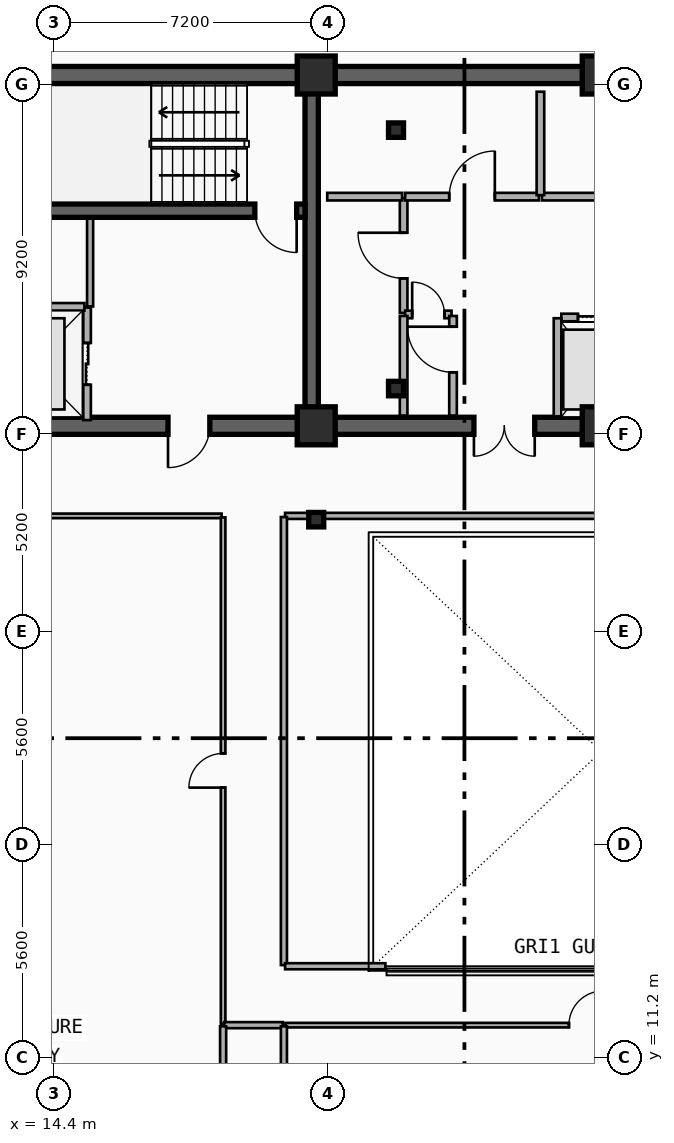
"""IFC4 building model, lengths in metres.
Left out: names, types, materials, properties, quantities, classifications, styles, units other than length and angle.
Written with IfcOpenShell. Run it as: python <this file> out.ifc"""

import sys

from ifc_helpers import new_model, si_unit, direction, frame, frame_2d, origin, origin_2d, place, context, subcontext, project, spatial, rectangle, i_section, extrude, element, fill, save


model = new_model("IFC4")
c1 = context("Model", 3, precision=1e-05, world=origin(), true_north=direction((0.0, 1.0)))
c2 = subcontext(c1, "Body", "Model", "MODEL_VIEW")
j1 = project(units=[si_unit("LENGTHUNIT", "METRE"), si_unit("PLANEANGLEUNIT", "RADIAN")], contexts=[c1])
p1 = place(None, origin())
s1 = spatial("IfcSite", under=j1, at=p1, CompositionType="ELEMENT")
p2 = place(p1, origin())
s2 = spatial("IfcBuilding", under=s1, at=p2, CompositionType="ELEMENT")
p3 = place(p2, frame((0.0, 0.0, 240.0)))
s3 = spatial("IfcBuildingStorey", under=s2, at=p3, CompositionType="ELEMENT", Elevation=240.0)
p4 = place(p3, frame((12.15, 37.05, 0.0), z_axis=(0.0, 0.0, 1.0), x_axis=(1.0, 0.0, 0.0)))
e1 = element("IfcWall", 1, at=p4, inside=s3, PredefinedType="SHEAR", context=c2, shape_type="SweptSolid", body=[
    extrude(rectangle(XDim=33.23, YDim=0.45, at=frame_2d((16.615, 0.0))), origin(), (0.0, 0.0, 1.0), 3.6),
])
p5 = place(p3, frame((21.18, 27.82, 0.0), z_axis=(0.0, 0.0, 1.0), x_axis=(-1.0, 0.0, 0.0)))
e2 = element("IfcWall", 2, at=p5, inside=s3, PredefinedType="SHEAR", context=c2, shape_type="SweptSolid", body=[
    extrude(rectangle(XDim=9.03, YDim=0.45, at=frame_2d((4.515, 0.0))), origin(), (0.0, 0.0, 1.0), 3.6),
])
p6 = place(p5, frame((2.68, 0.0, 0.0)))
e3 = element("IfcOpeningElement", 3, at=p6, cuts=e2, PredefinedType="OPENING", context=c2, shape_type="SweptSolid", body=[
    extrude(rectangle(XDim=1.1, YDim=2.15, at=frame_2d((0.55, 1.075))), frame((0.0, 0.235, 0.0), z_axis=(0.0, -1.0, 0.0), x_axis=(1.0, 0.0, 0.0)), (0.0, 0.0, 1.0), 0.47),
])
p7 = place(p3, frame((33.15, 27.82, 0.0), z_axis=(0.0, 0.0, 1.0), x_axis=(-1.0, 0.0, 0.0)))
e4 = element("IfcWall", 4, at=p7, inside=s3, PredefinedType="SHEAR", context=c2, shape_type="SweptSolid", body=[
    extrude(rectangle(XDim=11.97, YDim=0.45, at=frame_2d((5.985, 0.0))), origin(), (0.0, 0.0, 1.0), 3.6),
])
p8 = place(p7, frame((6.1, 0.0, 0.0)))
e5 = element("IfcOpeningElement", 5, at=p8, cuts=e4, PredefinedType="OPENING", context=c2, shape_type="SweptSolid", body=[
    extrude(rectangle(XDim=1.6, YDim=2.2, at=frame_2d((0.8, 1.1))), frame((0.0, 0.235, 0.0), z_axis=(0.0, -1.0, 0.0), x_axis=(1.0, 0.0, 0.0)), (0.0, 0.0, 1.0), 0.47),
])
p9 = place(p3, frame((21.18, 28.045, 0.0), z_axis=(0.0, 0.0, 1.0), x_axis=(0.0, 1.0, 0.0)))
e6 = element("IfcWall", 6, at=p9, inside=s3, PredefinedType="SHEAR", context=c2, shape_type="SweptSolid", body=[
    extrude(rectangle(XDim=8.78, YDim=0.35, at=frame_2d((4.39, 0.0))), origin(), (0.0, 0.0, 1.0), 3.6),
])
p10 = place(p3, frame((21.005, 33.48, 0.0), z_axis=(0.0, 0.0, 1.0), x_axis=(-1.0, 0.0, 0.0)))
e7 = element("IfcWall", 7, at=p10, inside=s3, PredefinedType="SHEAR", context=c2, shape_type="SweptSolid", body=[
    extrude(rectangle(XDim=8.63, YDim=0.35, at=frame_2d((4.315, 0.0))), origin(), (0.0, 0.0, 1.0), 3.6),
])
p11 = place(p10, frame((0.22, 0.0, 0.0)))
e8 = element("IfcOpeningElement", 8, at=p11, cuts=e7, PredefinedType="OPENING", context=c2, shape_type="SweptSolid", body=[
    extrude(rectangle(XDim=1.1, YDim=2.15, at=frame_2d((0.55, 1.075))), frame((0.0, 0.185, 0.0), z_axis=(0.0, -1.0, 0.0), x_axis=(1.0, 0.0, 0.0)), (0.0, 0.0, 1.0), 0.37),
])
for number, where, z_axis, x_axis in (
    (9, (23.4, 28.8, 0.0), (0.0, 0.0, 1.0), (1.0, 0.0, 0.0)),
    (10, (23.4, 35.6, 0.0), (0.0, 0.0, 1.0), (1.0, 0.0, 0.0)),
):
    element("IfcColumn", number, at=place(p3, frame(where, z_axis=z_axis, x_axis=x_axis)), inside=s3, PredefinedType="COLUMN", context=c2, shape_type="SweptSolid", body=[
        extrude(i_section(OverallWidth=0.395, OverallDepth=0.38, WebThickness=0.019, FlangeThickness=0.03, FilletRadius=0.015, at=origin_2d()), origin(), (0.0, 0.0, 1.0), 3.6),
    ])
for number, where, z_axis, x_axis in (
    (11, (21.3, 27.82, 0.0), (0.0, 0.0, 1.0), (1.0, 0.0, 0.0)),
    (12, (21.3, 37.05, 0.0), (0.0, 0.0, 1.0), (1.0, 0.0, 0.0)),
    (13, (28.8, 27.82, 0.0), (0.0, 0.0, 1.0), (1.0, 0.0, 0.0)),
    (14, (28.8, 37.05, 0.0), (0.0, 0.0, 1.0), (1.0, 0.0, 0.0)),
):
    element("IfcColumn", number, at=place(p3, frame(where, z_axis=z_axis, x_axis=x_axis)), inside=s3, PredefinedType="COLUMN", context=c2, shape_type="SweptSolid", body=[
        extrude(rectangle(XDim=1.0, YDim=1.0, at=origin_2d()), origin(), (0.0, 0.0, 1.0), 3.6),
    ])
p12 = place(p3, frame((21.3, 25.35, 0.0), z_axis=(0.0, 0.0, 1.0), x_axis=(1.0, 0.0, 0.0)))
e15 = element("IfcColumn", 15, at=p12, inside=s3, PredefinedType="COLUMN", context=c2, shape_type="SweptSolid", body=[
    extrude(i_section(OverallWidth=0.395, OverallDepth=0.38, WebThickness=0.019, FlangeThickness=0.03, FilletRadius=0.015, at=origin_2d()), origin(), (0.0, 0.0, 1.0), 3.6),
])
p13 = place(p3, frame((15.27, 27.97, 0.0), z_axis=(0.0, 0.0, 1.0), x_axis=(0.0, 1.0, 0.0)))
e16 = element("IfcWall", 16, at=p13, inside=s3, PredefinedType="PARTITIONING", context=c2, shape_type="SweptSolid", body=[
    extrude(rectangle(XDim=2.96, YDim=0.2, at=frame_2d((1.48, 0.0))), origin(), (0.0, 0.0, 1.0), 2.35),
])
p14 = place(p13, frame((0.93, 0.0, 0.0)))
e17 = element("IfcOpeningElement", 17, at=p14, cuts=e16, PredefinedType="OPENING", context=c2, shape_type="SweptSolid", body=[
    extrude(rectangle(XDim=1.1, YDim=2.15, at=frame_2d((0.55, 1.075))), frame((0.0, 0.11, 0.0), z_axis=(0.0, -1.0, 0.0), x_axis=(1.0, 0.0, 0.0)), (0.0, 0.0, 1.0), 0.22),
])
p15 = place(p3, frame((12.45, 30.95, 0.0), z_axis=(0.0, 0.0, 1.0), x_axis=(1.0, 0.0, 0.0)))
e18 = element("IfcWall", 18, at=p15, inside=s3, PredefinedType="PARTITIONING", context=c2, shape_type="SweptSolid", body=[
    extrude(rectangle(XDim=2.75, YDim=0.2, at=frame_2d((1.375, 0.0))), origin(), (0.0, 0.0, 1.0), 2.35),
])
p16 = place(p3, frame((27.75, 30.67, 0.0), z_axis=(0.0, 0.0, 1.0), x_axis=(1.0, 0.0, 0.0)))
e19 = element("IfcWall", 19, at=p16, inside=s3, PredefinedType="PARTITIONING", context=c2, shape_type="SweptSolid", body=[
    extrude(rectangle(XDim=1.975, YDim=0.2, at=frame_2d((0.988, 0.0))), origin(), (0.0, 0.0, 1.0), 2.35),
])
p17 = place(p16, frame((0.438, 0.0, 0.0)))
e20 = element("IfcOpeningElement", 20, at=p17, cuts=e19, PredefinedType="OPENING", context=c2, shape_type="SweptSolid", body=[
    extrude(rectangle(XDim=1.1, YDim=2.15, at=frame_2d((0.55, 1.075))), frame((0.0, 0.11, 0.0), z_axis=(0.0, -1.0, 0.0), x_axis=(1.0, 0.0, 0.0)), (0.0, 0.0, 1.0), 0.22),
])
p18 = place(p3, frame((27.65, 28.07, 0.0), z_axis=(0.0, 0.0, 1.0), x_axis=(0.0, 1.0, 0.0)))
e21 = element("IfcWall", 21, at=p18, inside=s3, PredefinedType="PARTITIONING", context=c2, shape_type="SweptSolid", body=[
    extrude(rectangle(XDim=2.58, YDim=0.2, at=frame_2d((1.29, 0.0))), origin(), (0.0, 0.0, 1.0), 2.35),
])
p19 = place(p3, frame((23.6, 30.79, 0.0), z_axis=(0.0, 0.0, 1.0), x_axis=(0.0, 1.0, 0.0)))
e22 = element("IfcWall", 22, at=p19, inside=s3, PredefinedType="PARTITIONING", context=c2, shape_type="SweptSolid", body=[
    extrude(rectangle(XDim=3.02, YDim=0.2, at=frame_2d((1.51, 0.0))), origin(), (0.0, 0.0, 1.0), 3.28),
])
p20 = place(p19, frame((0.91, 0.0, 0.0)))
e23 = element("IfcOpeningElement", 23, at=p20, cuts=e22, PredefinedType="OPENING", context=c2, shape_type="SweptSolid", body=[
    extrude(rectangle(XDim=1.2, YDim=2.15, at=frame_2d((0.6, 1.075))), frame((0.0, 0.11, 0.0), z_axis=(0.0, -1.0, 0.0), x_axis=(1.0, 0.0, 0.0)), (0.0, 0.0, 1.0), 0.22),
])
p21 = place(p3, frame((23.64, 30.75, 0.0), z_axis=(0.0, 0.0, 1.0), x_axis=(1.0, 0.0, 0.0)))
e24 = element("IfcWall", 24, at=p21, inside=s3, PredefinedType="PARTITIONING", context=c2, shape_type="SweptSolid", body=[
    extrude(rectangle(XDim=1.22, YDim=0.2, at=frame_2d((0.61, 0.0))), origin(), (0.0, 0.0, 1.0), 3.28),
])
p22 = place(p21, frame((0.185, 0.0, 0.0)))
e25 = element("IfcOpeningElement", 25, at=p22, cuts=e24, PredefinedType="OPENING", context=c2, shape_type="SweptSolid", body=[
    extrude(rectangle(XDim=0.85, YDim=2.1, at=frame_2d((0.425, 1.05))), frame((0.0, 0.11, 0.0), z_axis=(0.0, -1.0, 0.0), x_axis=(1.0, 0.0, 0.0)), (0.0, 0.0, 1.0), 0.22),
])
p23 = place(p3, frame((23.64, 33.85, 0.0), z_axis=(0.0, 0.0, 1.0), x_axis=(1.0, 0.0, 0.0)))
e26 = element("IfcWall", 26, at=p23, inside=s3, PredefinedType="PARTITIONING", context=c2, shape_type="SweptSolid", body=[
    extrude(rectangle(XDim=3.52, YDim=0.2, at=frame_2d((1.76, 0.0))), origin(), (0.0, 0.0, 1.0), 3.28),
])
p24 = place(p23, frame((1.16, 0.0, 0.0)))
e27 = element("IfcOpeningElement", 27, at=p24, cuts=e26, PredefinedType="OPENING", context=c2, shape_type="SweptSolid", body=[
    extrude(rectangle(XDim=1.2, YDim=2.15, at=frame_2d((0.6, 1.075))), frame((0.0, 0.11, 0.0), z_axis=(0.0, -1.0, 0.0), x_axis=(1.0, 0.0, 0.0)), (0.0, 0.0, 1.0), 0.22),
])
p25 = place(p3, frame((27.24, 33.85, 0.0), z_axis=(0.0, 0.0, 1.0), x_axis=(1.0, 0.0, 0.0)))
e28 = element("IfcWall", 28, at=p25, inside=s3, PredefinedType="PARTITIONING", context=c2, shape_type="SweptSolid", body=[
    extrude(rectangle(XDim=5.69, YDim=0.2, at=frame_2d((2.845, 0.0))), origin(), (0.0, 0.0, 1.0), 2.35),
])
p26 = place(p25, frame((2.245, 0.0, 0.0)))
e29 = element("IfcOpeningElement", 29, at=p26, cuts=e28, PredefinedType="OPENING", context=c2, shape_type="SweptSolid", body=[
    extrude(rectangle(XDim=1.2, YDim=2.15, at=frame_2d((0.6, 1.075))), frame((0.0, 0.11, 0.0), z_axis=(0.0, -1.0, 0.0), x_axis=(1.0, 0.0, 0.0)), (0.0, 0.0, 1.0), 0.22),
])
p27 = place(p3, frame((24.9, 28.09, 0.0), z_axis=(0.0, 0.0, 1.0), x_axis=(0.0, 1.0, 0.0)))
e30 = element("IfcWall", 30, at=p27, inside=s3, PredefinedType="PARTITIONING", context=c2, shape_type="SweptSolid", body=[
    extrude(rectangle(XDim=2.62, YDim=0.2, at=frame_2d((1.31, 0.0))), origin(), (0.0, 0.0, 1.0), 2.66),
])
p28 = place(p27, frame((1.137, 0.0, 0.0)))
e31 = element("IfcOpeningElement", 31, at=p28, cuts=e30, PredefinedType="OPENING", context=c2, shape_type="SweptSolid", body=[
    extrude(rectangle(XDim=1.2, YDim=2.15, at=frame_2d((0.6, 1.075))), frame((0.0, 0.11, 0.0), z_axis=(0.0, -1.0, 0.0), x_axis=(1.0, 0.0, 0.0)), (0.0, 0.0, 1.0), 0.22),
])
p29 = place(p3, frame((23.6, 28.09, 0.0), z_axis=(0.0, 0.0, 1.0), x_axis=(0.0, 1.0, 0.0)))
e32 = element("IfcWall", 32, at=p29, inside=s3, PredefinedType="PARTITIONING", context=c2, shape_type="SweptSolid", body=[
    extrude(rectangle(XDim=2.62, YDim=0.2, at=frame_2d((1.31, 0.0))), origin(), (0.0, 0.0, 1.0), 2.66),
])
p30 = place(p3, frame((21.59, 33.85, 0.0), z_axis=(0.0, 0.0, 1.0), x_axis=(1.0, 0.0, 0.0)))
e33 = element("IfcWall", 33, at=p30, inside=s3, PredefinedType="PARTITIONING", context=c2, shape_type="SweptSolid", body=[
    extrude(rectangle(XDim=1.97, YDim=0.2, at=frame_2d((0.985, 0.0))), origin(), (0.0, 0.0, 1.0), 2.35),
])
p31 = place(p3, frame((27.2, 33.89, 0.0), z_axis=(0.0, 0.0, 1.0), x_axis=(0.0, 1.0, 0.0)))
e34 = element("IfcWall", 34, at=p31, inside=s3, PredefinedType="PARTITIONING", context=c2, shape_type="SweptSolid", body=[
    extrude(rectangle(XDim=2.72, YDim=0.2, at=frame_2d((1.36, 0.0))), origin(), (0.0, 0.0, 1.0), 3.28),
])
p32 = place(p3, frame((5.66, 25.45, 0.0), z_axis=(0.0, 0.0, 1.0), x_axis=(1.0, 0.0, 0.0)))
e35 = element("IfcWall", 35, at=p32, inside=s3, PredefinedType="PARTITIONING", context=c2, shape_type="SweptSolid", body=[
    extrude(rectangle(XDim=13.15, YDim=0.12, at=frame_2d((6.575, 0.0))), origin(), (0.0, 0.0, 1.0), 2.56),
])
p33 = place(p32, frame((0.639, 0.0, 0.0)))
e36 = element("IfcOpeningElement", 36, at=p33, cuts=e35, PredefinedType="OPENING", context=c2, shape_type="SweptSolid", body=[
    extrude(rectangle(XDim=0.9, YDim=2.1, at=frame_2d((0.45, 1.05))), frame((0.0, 0.07, 0.0), z_axis=(0.0, -1.0, 0.0), x_axis=(1.0, 0.0, 0.0)), (0.0, 0.0, 1.0), 0.14),
])
p34 = place(p3, frame((18.85, 12.09, 0.0), z_axis=(0.0, 0.0, 1.0), x_axis=(0.0, 1.0, 0.0)))
e37 = element("IfcWall", 37, at=p34, inside=s3, PredefinedType="PARTITIONING", context=c2, shape_type="SweptSolid", body=[
    extrude(rectangle(XDim=13.32, YDim=0.12, at=frame_2d((6.66, 0.0))), origin(), (0.0, 0.0, 1.0), 2.71),
])
p35 = place(p34, frame((6.21, 0.0, 0.0)))
e38 = element("IfcOpeningElement", 38, at=p35, cuts=e37, PredefinedType="OPENING", context=c2, shape_type="SweptSolid", body=[
    extrude(rectangle(XDim=0.9, YDim=2.1, at=frame_2d((0.45, 1.05))), frame((0.0, 0.07, 0.0), z_axis=(0.0, -1.0, 0.0), x_axis=(1.0, 0.0, 0.0)), (0.0, 0.0, 1.0), 0.14),
])
p36 = place(p3, frame((20.49, 12.05, 0.0), z_axis=(0.0, 0.0, 1.0), x_axis=(1.0, 0.0, 0.0)))
e39 = element("IfcWall", 39, at=p36, inside=s3, PredefinedType="PARTITIONING", context=c2, shape_type="SweptSolid", body=[
    extrude(rectangle(XDim=15.82, YDim=0.12, at=frame_2d((7.91, 0.0))), origin(), (0.0, 0.0, 1.0), 2.56),
])
p37 = place(p36, frame((7.46, 0.0, 0.0)))
e40 = element("IfcOpeningElement", 40, at=p37, cuts=e39, PredefinedType="OPENING", context=c2, shape_type="SweptSolid", body=[
    extrude(rectangle(XDim=0.9, YDim=2.1, at=frame_2d((0.45, 1.05))), frame((0.0, 0.07, 0.0), z_axis=(0.0, -1.0, 0.0), x_axis=(1.0, 0.0, 0.0)), (0.0, 0.0, 1.0), 0.14),
])
p38 = place(p3, frame((15.35, 30.96, 0.0), z_axis=(0.0, 0.0, 1.0), x_axis=(0.0, 1.0, 0.0)))
e41 = element("IfcWall", 41, at=p38, inside=s3, PredefinedType="PARTITIONING", context=c2, shape_type="SweptSolid", body=[
    extrude(rectangle(XDim=2.31, YDim=0.16, at=frame_2d((1.155, 0.0))), origin(), (0.0, 0.0, 1.0), 3.28),
])
p39 = place(p3, frame((20.48, 25.45, 0.0), z_axis=(0.0, 0.0, 1.0), x_axis=(1.0, 0.0, 0.0)))
e42 = element("IfcWall", 42, at=p39, inside=s3, PredefinedType="PARTITIONING", context=c2, shape_type="SweptSolid", body=[
    extrude(rectangle(XDim=15.84, YDim=0.16, at=frame_2d((7.92, 0.0))), origin(), (0.0, 0.0, 1.0), 2.56),
])
p40 = place(p3, frame((18.88, 12.05, 0.0), z_axis=(0.0, 0.0, 1.0), x_axis=(1.0, 0.0, 0.0)))
e43 = element("IfcWall", 43, at=p40, inside=s3, PredefinedType="PARTITIONING", context=c2, shape_type="SweptSolid", body=[
    extrude(rectangle(XDim=1.54, YDim=0.16, at=frame_2d((0.77, 0.0))), origin(), (0.0, 0.0, 1.0), 2.71),
])
p41 = place(p3, frame((20.45, 13.63, 0.0), z_axis=(0.0, 0.0, 1.0), x_axis=(0.0, 1.0, 0.0)))
e44 = element("IfcWall", 44, at=p41, inside=s3, PredefinedType="PARTITIONING", context=c2, shape_type="SweptSolid", body=[
    extrude(rectangle(XDim=11.79, YDim=0.16, at=frame_2d((5.895, 0.0))), origin(), (0.0, 0.0, 1.0), 2.71),
])
p42 = place(p3, frame((20.48, 13.6, 0.0), z_axis=(0.0, 0.0, 1.0), x_axis=(1.0, 0.0, 0.0)))
e45 = element("IfcWall", 45, at=p42, inside=s3, PredefinedType="PARTITIONING", context=c2, shape_type="SweptSolid", body=[
    extrude(rectangle(XDim=2.64, YDim=0.16, at=frame_2d((1.32, 0.0))), origin(), (0.0, 0.0, 1.0), 2.56),
])
for number, where, z_axis, x_axis in (
    (46, (18.85, 4.69, 0.0), (0.0, 0.0, 1.0), (0.0, 1.0, 0.0)),
    (47, (20.45, 4.69, 0.0), (0.0, 0.0, 1.0), (0.0, 1.0, 0.0)),
):
    element("IfcWall", number, at=place(p3, frame(where, z_axis=z_axis, x_axis=x_axis)), inside=s3, PredefinedType="PARTITIONING", context=c2, shape_type="SweptSolid", body=[
        extrude(rectangle(XDim=7.33, YDim=0.16, at=frame_2d((3.665, 0.0))), origin(), (0.0, 0.0, 1.0), 2.71),
    ])
p43 = place(p14, origin())
e48 = element("IfcDoor", 48, at=p43, inside=s3, OperationType="DOUBLE_DOOR_SLIDING", PredefinedType="DOOR", context=c2, shape_type="SweptSolid", body=[
    extrude(rectangle(XDim=1.1, YDim=2.15, at=frame_2d((0.55, 1.075))), frame((0.0, 0.025, 0.0), z_axis=(0.0, -1.0, 0.0), x_axis=(1.0, 0.0, 0.0)), (0.0, 0.0, 1.0), 0.05),
])
fill(e17, e48)
p44 = place(p17, origin())
e49 = element("IfcDoor", 49, at=p44, inside=s3, OperationType="DOUBLE_DOOR_SLIDING", PredefinedType="DOOR", context=c2, shape_type="SweptSolid", body=[
    extrude(rectangle(XDim=1.1, YDim=2.15, at=frame_2d((0.55, 1.075))), frame((0.0, 0.025, 0.0), z_axis=(0.0, -1.0, 0.0), x_axis=(1.0, 0.0, 0.0)), (0.0, 0.0, 1.0), 0.05),
])
fill(e20, e49)
p45 = place(p11, origin())
e50 = element("IfcDoor", 50, at=p45, inside=s3, OperationType="SINGLE_SWING_LEFT", PredefinedType="DOOR", context=c2, shape_type="SweptSolid", body=[
    extrude(rectangle(XDim=1.1, YDim=2.15, at=frame_2d((0.55, 1.075))), frame((0.0, 0.025, 0.0), z_axis=(0.0, -1.0, 0.0), x_axis=(1.0, 0.0, 0.0)), (0.0, 0.0, 1.0), 0.05),
])
fill(e8, e50)
p46 = place(p6, origin())
e51 = element("IfcDoor", 51, at=p46, inside=s3, OperationType="SINGLE_SWING_RIGHT", PredefinedType="DOOR", context=c2, shape_type="SweptSolid", body=[
    extrude(rectangle(XDim=1.1, YDim=2.15, at=frame_2d((0.55, 1.075))), frame((0.0, 0.025, 0.0), z_axis=(0.0, -1.0, 0.0), x_axis=(1.0, 0.0, 0.0)), (0.0, 0.0, 1.0), 0.05),
])
fill(e3, e51)
p47 = place(p8, origin())
e52 = element("IfcDoor", 52, at=p47, inside=s3, OperationType="SINGLE_SWING_LEFT", PredefinedType="DOOR", context=c2, shape_type="SweptSolid", body=[
    extrude(rectangle(XDim=1.6, YDim=2.2, at=frame_2d((0.8, 1.1))), frame((0.0, 0.025, 0.0), z_axis=(0.0, -1.0, 0.0), x_axis=(1.0, 0.0, 0.0)), (0.0, 0.0, 1.0), 0.05),
])
fill(e5, e52)
p48 = place(p20, origin())
e53 = element("IfcDoor", 53, at=p48, inside=s3, OperationType="SINGLE_SWING_RIGHT", PredefinedType="DOOR", context=c2, shape_type="SweptSolid", body=[
    extrude(rectangle(XDim=1.2, YDim=2.15, at=frame_2d((0.6, 1.075))), frame((0.0, 0.025, 0.0), z_axis=(0.0, -1.0, 0.0), x_axis=(1.0, 0.0, 0.0)), (0.0, 0.0, 1.0), 0.05),
])
fill(e23, e53)
p49 = place(p22, origin())
e54 = element("IfcDoor", 54, at=p49, inside=s3, OperationType="SINGLE_SWING_LEFT", PredefinedType="DOOR", context=c2, shape_type="SweptSolid", body=[
    extrude(rectangle(XDim=0.85, YDim=2.1, at=frame_2d((0.425, 1.05))), frame((0.0, 0.025, 0.0), z_axis=(0.0, -1.0, 0.0), x_axis=(1.0, 0.0, 0.0)), (0.0, 0.0, 1.0), 0.05),
])
fill(e25, e54)
p50 = place(p24, origin())
e55 = element("IfcDoor", 55, at=p50, inside=s3, OperationType="SINGLE_SWING_RIGHT", PredefinedType="DOOR", context=c2, shape_type="SweptSolid", body=[
    extrude(rectangle(XDim=1.2, YDim=2.15, at=frame_2d((0.6, 1.075))), frame((0.0, 0.025, 0.0), z_axis=(0.0, -1.0, 0.0), x_axis=(1.0, 0.0, 0.0)), (0.0, 0.0, 1.0), 0.05),
])
fill(e27, e55)
p51 = place(p28, origin())
e56 = element("IfcDoor", 56, at=p51, inside=s3, OperationType="SINGLE_SWING_RIGHT", PredefinedType="DOOR", context=c2, shape_type="SweptSolid", body=[
    extrude(rectangle(XDim=1.2, YDim=2.15, at=frame_2d((0.6, 1.075))), frame((0.0, 0.025, 0.0), z_axis=(0.0, -1.0, 0.0), x_axis=(1.0, 0.0, 0.0)), (0.0, 0.0, 1.0), 0.05),
])
fill(e31, e56)
p52 = place(p35, origin())
e57 = element("IfcDoor", 57, at=p52, inside=s3, OperationType="SINGLE_SWING_LEFT", PredefinedType="DOOR", context=c2, shape_type="SweptSolid", body=[
    extrude(rectangle(XDim=0.9, YDim=2.1, at=frame_2d((0.45, 1.05))), frame((0.0, 0.025, 0.0), z_axis=(0.0, -1.0, 0.0), x_axis=(1.0, 0.0, 0.0)), (0.0, 0.0, 1.0), 0.05),
])
fill(e38, e57)
p53 = place(p37, origin())
e58 = element("IfcDoor", 58, at=p53, inside=s3, OperationType="SINGLE_SWING_RIGHT", PredefinedType="DOOR", context=c2, shape_type="SweptSolid", body=[
    extrude(rectangle(XDim=0.9, YDim=2.1, at=frame_2d((0.45, 1.05))), frame((0.0, 0.025, 0.0), z_axis=(0.0, -1.0, 0.0), x_axis=(1.0, 0.0, 0.0)), (0.0, 0.0, 1.0), 0.05),
])
fill(e40, e58)
save(model, sys.argv[1])
